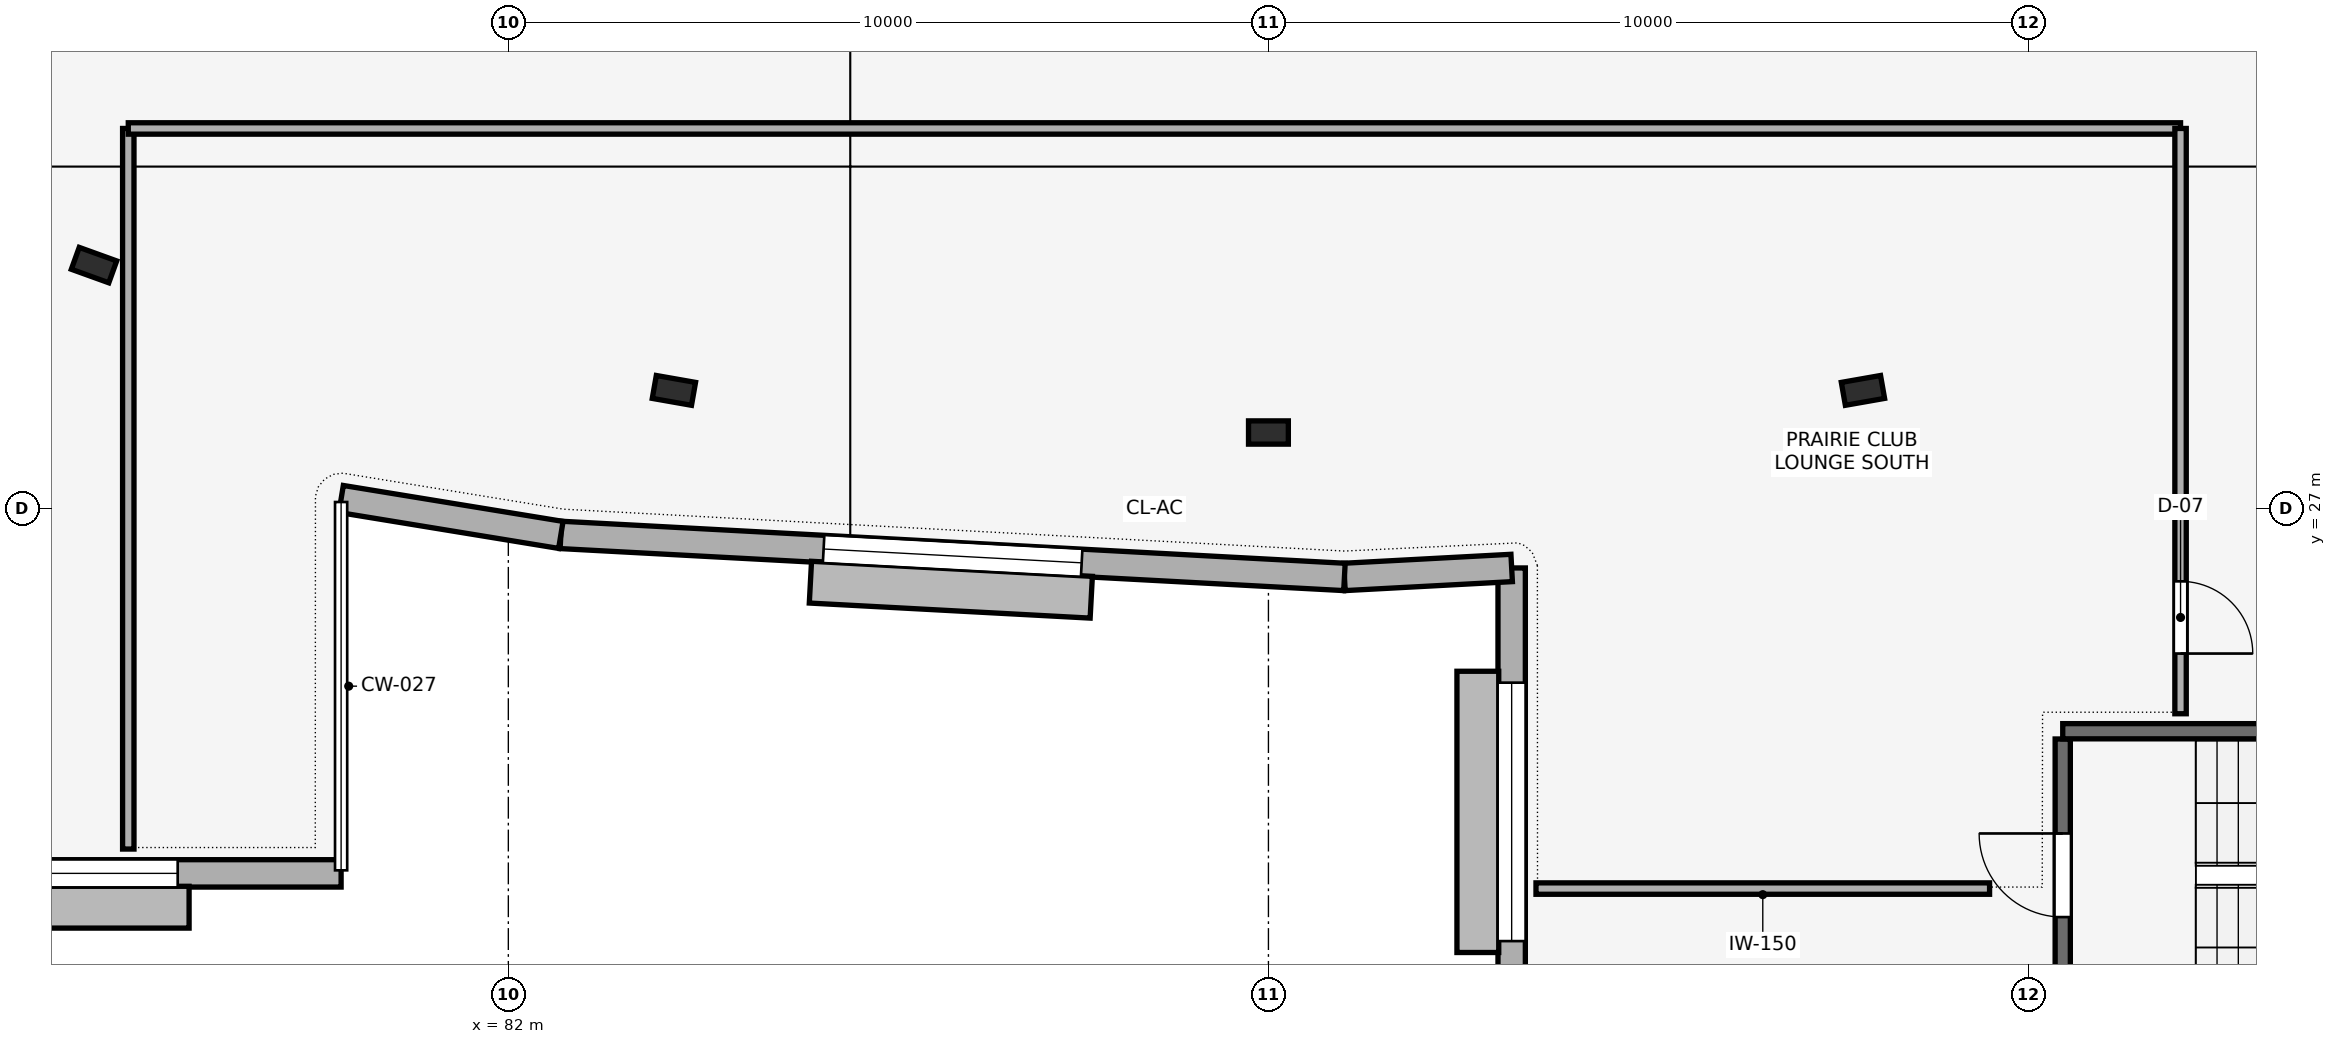
"""IFC4 building model, lengths in metres.
Left out: names, types, materials, properties, quantities, classifications, styles, units other than length and angle.
Written with IfcOpenShell. Run it as: python <this file> out.ifc"""

import sys

from ifc_helpers import new_model, si_unit, direction, frame, frame_2d, origin, origin_2d, place, context, subcontext, project, spatial, rectangle, i_section, extrude, element, fill, save


model = new_model("IFC4")
c1 = context("Model", 3, precision=1e-05, world=origin(), true_north=direction((0.0, 1.0)))
c2 = subcontext(c1, "Body", "Model", "MODEL_VIEW")
j1 = project(units=[si_unit("LENGTHUNIT", "METRE"), si_unit("PLANEANGLEUNIT", "RADIAN")], contexts=[c1])
p1 = place(None, origin())
s1 = spatial("IfcSite", under=j1, at=p1, CompositionType="ELEMENT")
p2 = place(p1, origin())
s2 = spatial("IfcBuilding", under=s1, at=p2, CompositionType="ELEMENT")
p3 = place(p2, frame((0.0, 0.0, 10.2)))
s3 = spatial("IfcBuildingStorey", under=s2, at=p3, CompositionType="ELEMENT", Elevation=10.2)
for number, where, z_axis, x_axis in (
    (1, (76.549, 30.202, 0.0), (0.0, 0.0, 1.0), (-0.34, -0.941, 0.0)),
    (2, (84.178, 28.554, 0.0), (0.0, 0.0, 1.0), (-0.173, -0.985, 0.0)),
    (3, (92.0, 28.0, 0.0), (0.0, 0.0, 1.0), (0.0, -1.0, 0.0)),
    (4, (99.822, 28.554, 0.0), (0.0, 0.0, 1.0), (0.173, -0.985, 0.0)),
):
    element("IfcColumn", number, at=place(p3, frame(where, z_axis=z_axis, x_axis=x_axis)), inside=s3, PredefinedType="COLUMN", context=c2, shape_type="SweptSolid", body=[
        extrude(i_section(OverallWidth=0.306, OverallDepth=0.524, WebThickness=0.021, FlangeThickness=0.04, FilletRadius=0.027, at=origin_2d()), origin(), (0.0, 0.0, 1.0), 4.8),
    ])
p4 = place(p3, frame((95.2, 19.8, 0.0), z_axis=(0.0, 0.0, 1.0), x_axis=(0.0, 1.0, 0.0)))
e5 = element("IfcWall", 5, at=p4, inside=s3, PredefinedType="STANDARD", context=c2, shape_type="SweptSolid", body=[
    extrude(rectangle(XDim=6.418, YDim=0.36, at=frame_2d((3.209, 0.0))), origin(), (0.0, 0.0, 1.0), 4.52),
])
p5 = place(p4, frame((1.509, 0.0, 0.9)))
e6 = element("IfcOpeningElement", 6, at=p5, cuts=e5, PredefinedType="OPENING", context=c2, shape_type="SweptSolid", body=[
    extrude(rectangle(XDim=3.4, YDim=2.0, at=frame_2d((1.7, 1.0))), frame((0.0, 0.19, 0.0), z_axis=(0.0, -1.0, 0.0), x_axis=(1.0, 0.0, 0.0)), (0.0, 0.0, 1.0), 0.38),
])
p6 = place(p3, frame((95.2, 26.218, 0.0), z_axis=(0.0, 0.0, 1.0), x_axis=(-0.998566546223, -0.053524319368, 0.0)))
e7 = element("IfcWall", 7, at=p6, inside=s3, PredefinedType="STANDARD", context=c2, shape_type="SweptSolid", body=[
    extrude(rectangle(XDim=2.203, YDim=0.36, at=frame_2d((1.102, 0.0))), origin(), (0.0, 0.0, 1.0), 4.52),
])
p7 = place(p3, frame((93.0, 26.1, 0.0), z_axis=(0.0, 0.0, 1.0), x_axis=(-0.998565740143, 0.053539355745, 0.0)))
e8 = element("IfcWall", 8, at=p7, inside=s3, PredefinedType="STANDARD", context=c2, shape_type="SweptSolid", body=[
    extrude(rectangle(XDim=10.324, YDim=0.36, at=frame_2d((5.162, 0.0))), origin(), (0.0, 0.0, 1.0), 3.515),
])
p8 = place(p7, frame((3.462, 0.0, 0.9)))
e9 = element("IfcOpeningElement", 9, at=p8, cuts=e8, PredefinedType="OPENING", context=c2, shape_type="SweptSolid", body=[
    extrude(rectangle(XDim=3.4, YDim=2.0, at=frame_2d((1.7, 1.0))), frame((0.0, 0.19, 0.0), z_axis=(0.0, -1.0, 0.0), x_axis=(1.0, 0.0, 0.0)), (0.0, 0.0, 1.0), 0.38),
])
p9 = place(p3, frame((82.691, 26.653, 0.0), z_axis=(0.0, 0.0, 1.0), x_axis=(-0.986882792643, 0.161438389439, 0.0)))
e10 = element("IfcWall", 10, at=p9, inside=s3, PredefinedType="STANDARD", context=c2, shape_type="SweptSolid", body=[
    extrude(rectangle(XDim=2.929, YDim=0.36, at=frame_2d((1.465, 0.0))), origin(), (0.0, 0.0, 1.0), 3.515),
])
p10 = place(p3, frame((79.8, 22.2, 0.0), z_axis=(0.0, 0.0, 1.0), x_axis=(-1.0, 0.0, 0.0)))
e11 = element("IfcWall", 11, at=p10, inside=s3, PredefinedType="STANDARD", context=c2, shape_type="SweptSolid", body=[
    extrude(rectangle(XDim=7.7, YDim=0.36, at=frame_2d((3.85, 0.0))), origin(), (0.0, 0.0, 1.0), 4.52),
])
p11 = place(p10, frame((2.15, 0.0, 0.9)))
e12 = element("IfcOpeningElement", 12, at=p11, cuts=e11, PredefinedType="OPENING", context=c2, shape_type="SweptSolid", body=[
    extrude(rectangle(XDim=3.4, YDim=2.0, at=frame_2d((1.7, 1.0))), frame((0.0, 0.19, 0.0), z_axis=(0.0, -1.0, 0.0), x_axis=(1.0, 0.0, 0.0)), (0.0, 0.0, 1.0), 0.38),
])
p12 = place(p3, frame((102.45, 20.382, 0.0), z_axis=(0.0, 0.0, 1.0), x_axis=(0.0, 1.0, 0.0)))
e13 = element("IfcWall", 13, at=p12, inside=s3, PredefinedType="SHEAR", context=c2, shape_type="SweptSolid", body=[
    extrude(rectangle(XDim=3.586, YDim=0.2, at=frame_2d((1.793, 0.0))), origin(), (0.0, 0.0, 1.0), 4.8),
])
p13 = place(p12, frame((1.243, 0.0, 0.0)))
e14 = element("IfcOpeningElement", 14, at=p13, cuts=e13, PredefinedType="OPENING", context=c2, shape_type="SweptSolid", body=[
    extrude(rectangle(XDim=1.1, YDim=2.15, at=frame_2d((0.55, 1.075))), frame((0.0, 0.11, 0.0), z_axis=(0.0, -1.0, 0.0), x_axis=(1.0, 0.0, 0.0)), (0.0, 0.0, 1.0), 0.22),
])
p14 = place(p3, frame((102.45, 24.07, 0.0), z_axis=(0.0, 0.0, 1.0), x_axis=(1.0, 0.0, 0.0)))
e15 = element("IfcWall", 15, at=p14, inside=s3, PredefinedType="SHEAR", context=c2, shape_type="SweptSolid", body=[
    extrude(rectangle(XDim=7.95, YDim=0.2, at=frame_2d((3.975, 0.0))), origin(), (0.0, 0.0, 1.0), 4.8),
])
p15 = place(p3, frame((101.488, 22.0, 0.0), z_axis=(0.0, 0.0, 1.0), x_axis=(-1.0, 0.0, 0.0)))
e16 = element("IfcWall", 16, at=p15, inside=s3, PredefinedType="PARTITIONING", context=c2, shape_type="SweptSolid", body=[
    extrude(rectangle(XDim=5.968, YDim=0.15, at=frame_2d((2.984, 0.0))), origin(), (0.0, 0.0, 1.0), 4.52),
])
p16 = place(p3, frame((77.0, 22.52, 0.0), z_axis=(0.0, 0.0, 1.0), x_axis=(0.0, 1.0, 0.0)))
e17 = element("IfcWall", 17, at=p16, inside=s3, PredefinedType="PARTITIONING", context=c2, shape_type="SweptSolid", body=[
    extrude(rectangle(XDim=9.48, YDim=0.15, at=frame_2d((4.74, 0.0))), origin(), (0.0, 0.0, 1.0), 4.52),
])
p17 = place(p3, frame((77.0, 32.0, 0.0), z_axis=(0.0, 0.0, 1.0), x_axis=(1.0, 0.0, 0.0)))
e18 = element("IfcWall", 18, at=p17, inside=s3, PredefinedType="PARTITIONING", context=c2, shape_type="SweptSolid", body=[
    extrude(rectangle(XDim=27.0, YDim=0.15, at=frame_2d((13.5, 0.0))), origin(), (0.0, 0.0, 1.0), 4.52),
])
p18 = place(p3, frame((104.0, 32.0, 0.0), z_axis=(0.0, 0.0, 1.0), x_axis=(0.0, -1.0, 0.0)))
e19 = element("IfcWall", 19, at=p18, inside=s3, PredefinedType="PARTITIONING", context=c2, shape_type="SweptSolid", body=[
    extrude(rectangle(XDim=7.7, YDim=0.15, at=frame_2d((3.85, 0.0))), origin(), (0.0, 0.0, 1.0), 4.52),
])
p19 = place(p18, frame((5.958, 0.0, 0.0)))
e20 = element("IfcOpeningElement", 20, at=p19, cuts=e19, PredefinedType="OPENING", context=c2, shape_type="SweptSolid", body=[
    extrude(rectangle(XDim=0.95, YDim=2.1, at=frame_2d((0.475, 1.05))), frame((0.0, 0.085, 0.0), z_axis=(0.0, -1.0, 0.0), x_axis=(1.0, 0.0, 0.0)), (0.0, 0.0, 1.0), 0.17),
])
p20 = place(p5, origin())
e21 = element("IfcWindow", 21, at=p20, inside=s3, PartitioningType="SINGLE_PANEL", PredefinedType="WINDOW", context=c2, shape_type="SweptSolid", body=[
    extrude(rectangle(XDim=3.4, YDim=2.0, at=frame_2d((1.7, 1.0))), frame((0.0, 0.03, 0.0), z_axis=(0.0, -1.0, 0.0), x_axis=(1.0, 0.0, 0.0)), (0.0, 0.0, 1.0), 0.06),
])
fill(e6, e21)
p21 = place(p8, origin())
e22 = element("IfcWindow", 22, at=p21, inside=s3, PartitioningType="SINGLE_PANEL", PredefinedType="WINDOW", context=c2, shape_type="SweptSolid", body=[
    extrude(rectangle(XDim=3.4, YDim=2.0, at=frame_2d((1.7, 1.0))), frame((0.0, 0.03, 0.0), z_axis=(0.0, -1.0, 0.0), x_axis=(1.0, 0.0, 0.0)), (0.0, 0.0, 1.0), 0.06),
])
fill(e9, e22)
p22 = place(p11, origin())
e23 = element("IfcWindow", 23, at=p22, inside=s3, PartitioningType="SINGLE_PANEL", PredefinedType="WINDOW", context=c2, shape_type="SweptSolid", body=[
    extrude(rectangle(XDim=3.4, YDim=2.0, at=frame_2d((1.7, 1.0))), frame((0.0, 0.03, 0.0), z_axis=(0.0, -1.0, 0.0), x_axis=(1.0, 0.0, 0.0)), (0.0, 0.0, 1.0), 0.06),
])
fill(e12, e23)
p23 = place(p13, frame((1.1, 0.0, 0.0), z_axis=(0.0, 0.0, 1.0), x_axis=(-1.0, 0.0, 0.0)))
e24 = element("IfcDoor", 24, at=p23, inside=s3, OperationType="SINGLE_SWING_LEFT", PredefinedType="DOOR", context=c2, shape_type="SweptSolid", body=[
    extrude(rectangle(XDim=1.1, YDim=2.15, at=frame_2d((0.55, 1.075))), frame((0.0, 0.025, 0.0), z_axis=(0.0, -1.0, 0.0), x_axis=(1.0, 0.0, 0.0)), (0.0, 0.0, 1.0), 0.05),
])
fill(e14, e24)
p24 = place(p19, origin())
e25 = element("IfcDoor", 25, at=p24, inside=s3, OperationType="SINGLE_SWING_RIGHT", PredefinedType="DOOR", context=c2, shape_type="SweptSolid", body=[
    extrude(rectangle(XDim=0.95, YDim=2.1, at=frame_2d((0.475, 1.05))), frame((0.0, 0.025, 0.0), z_axis=(0.0, -1.0, 0.0), x_axis=(1.0, 0.0, 0.0)), (0.0, 0.0, 1.0), 0.05),
])
fill(e20, e25)
save(model, sys.argv[1])
